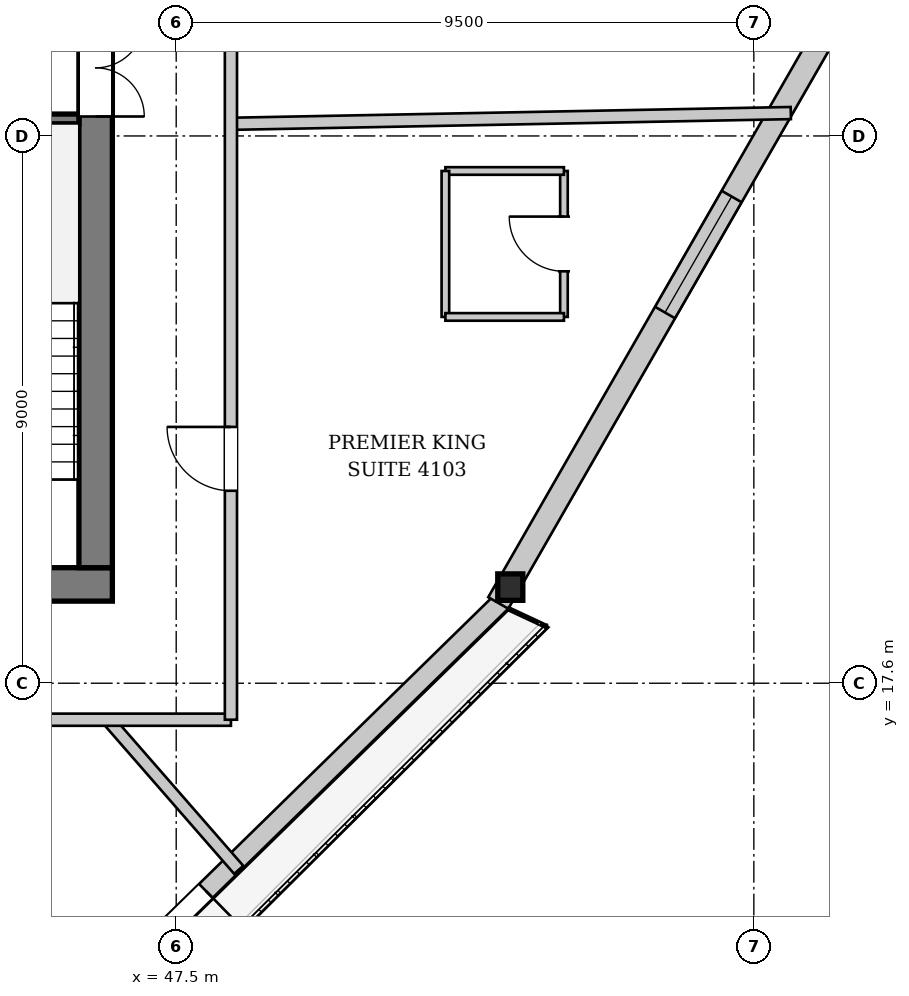
"""IFC4 building model, lengths in metres.
Left out: names, types, materials, properties, quantities, classifications, styles, units other than length and angle.
Written with IfcOpenShell. Run it as: python <this file> out.ifc"""

import sys

from ifc_helpers import new_model, si_unit, direction, frame, frame_2d, origin, origin_2d, place, context, subcontext, project, spatial, rectangle, i_section, extrude, source, transform, mapped, element, fill, save


model = new_model("IFC4")
c1 = context("Model", 3, precision=1e-05, world=origin(), true_north=direction((0.0, 1.0)))
c2 = subcontext(c1, "Body", "Model", "MODEL_VIEW")
j1 = project(units=[si_unit("LENGTHUNIT", "METRE"), si_unit("PLANEANGLEUNIT", "RADIAN")], contexts=[c1])
p1 = place(None, origin())
s1 = spatial("IfcSite", under=j1, at=p1, CompositionType="ELEMENT")
p2 = place(p1, origin())
s2 = spatial("IfcBuilding", under=s1, at=p2, CompositionType="ELEMENT")
p3 = place(p2, frame((0.0, 0.0, 157.25)))
s3 = spatial("IfcBuildingStorey", under=s2, at=p3, CompositionType="ELEMENT", Elevation=157.25)
m1 = source(origin(), c2, "Body", "SweptSolid", [
    extrude(i_section(OverallWidth=0.412, OverallDepth=0.435, WebThickness=0.031, FlangeThickness=0.05, at=origin_2d()), origin(), (0.0, 0.0, 1.0), 3.459),
])
p4 = place(p3, frame((52.962, 18.826, 0.0), z_axis=(0.018843973792, 0.205166411286, 0.978545680248), x_axis=(-0.995808540484, 0.091462291128, 0.0)))
e1 = element("IfcColumn", 1, at=p4, inside=s3, PredefinedType="COLUMN", context=c2, shape_type="MappedRepresentation", body=[
    mapped(m1, transform((0.0, 0.0, 0.0), x_axis=(1.0, 0.0, 0.0), y_axis=(0.0, 1.0, 0.0), z_axis=(0.0, 0.0, 1.0), scale=1.0)),
])
p5 = place(p3, frame((52.85, 18.94, 0.0), z_axis=(0.0, 0.0, 1.0), x_axis=(-0.714884953244, -0.699242092287, 0.0)))
e2 = element("IfcWall", 2, at=p5, inside=s3, PredefinedType="SOLIDWALL", context=c2, shape_type="SweptSolid", body=[
    extrude(rectangle(XDim=23.598, YDim=0.32, at=frame_2d((11.799, 0.0))), origin(), (0.0, 0.0, 1.0), 2.722),
])
p6 = place(p5, frame((6.801, 0.0, 0.0)))
e3 = element("IfcOpeningElement", 3, at=p6, cuts=e2, PredefinedType="OPENING", context=c2, shape_type="SweptSolid", body=[
    extrude(rectangle(XDim=1.5, YDim=2.3, at=frame_2d((0.75, 1.15))), frame((0.0, 0.17, 0.0), z_axis=(0.0, -1.0, 0.0), x_axis=(1.0, 0.0, 0.0)), (0.0, 0.0, 1.0), 0.34),
])
p7 = place(p5, frame((16.163, 0.0, 0.252)))
e4 = element("IfcOpeningElement", 4, at=p7, cuts=e2, PredefinedType="OPENING", context=c2, shape_type="SweptSolid", body=[
    extrude(rectangle(XDim=2.6, YDim=2.35, at=frame_2d((1.3, 1.175))), frame((0.0, 0.17, 0.0), z_axis=(0.0, -1.0, 0.0), x_axis=(1.0, 0.0, 0.0)), (0.0, 0.0, 1.0), 0.34),
])
p8 = place(p3, frame((64.549, 39.384, 0.0), z_axis=(0.0, 0.0, 1.0), x_axis=(-0.49798956696, -0.867183020589, 0.0)))
e5 = element("IfcWall", 5, at=p8, inside=s3, PredefinedType="SOLIDWALL", context=c2, shape_type="SweptSolid", body=[
    extrude(rectangle(XDim=23.598, YDim=0.38, at=frame_2d((11.799, 0.0))), origin(), (0.0, 0.0, 1.0), 2.722),
])
p9 = place(p8, frame((5.507, 0.0, 0.352)))
e6 = element("IfcOpeningElement", 6, at=p9, cuts=e5, PredefinedType="OPENING", context=c2, shape_type="SweptSolid", body=[
    extrude(rectangle(XDim=2.2, YDim=2.25, at=frame_2d((1.1, 1.125))), frame((0.0, 0.2, 0.0), z_axis=(0.0, -1.0, 0.0), x_axis=(1.0, 0.0, 0.0)), (0.0, 0.0, 1.0), 0.4),
])
p10 = place(p8, frame((15.891, 0.0, 0.352)))
e7 = element("IfcOpeningElement", 7, at=p10, cuts=e5, PredefinedType="OPENING", context=c2, shape_type="SweptSolid", body=[
    extrude(rectangle(XDim=2.2, YDim=2.25, at=frame_2d((1.1, 1.125))), frame((0.0, 0.2, 0.0), z_axis=(0.0, -1.0, 0.0), x_axis=(1.0, 0.0, 0.0)), (0.0, 0.0, 1.0), 0.4),
])
p11 = place(p3, frame((46.45, 19.225, 0.0), z_axis=(0.0, 0.0, 1.0), x_axis=(-1.0, 0.0, 0.0)))
e8 = element("IfcWall", 8, at=p11, inside=s3, PredefinedType="SHEAR", context=c2, shape_type="SweptSolid", body=[
    extrude(rectangle(XDim=16.9, YDim=0.55, at=frame_2d((8.45, 0.0))), origin(), (0.0, 0.0, 1.0), 3.33),
])
p12 = place(p11, frame((4.65, 0.0, 0.0)))
e9 = element("IfcOpeningElement", 9, at=p12, cuts=e8, PredefinedType="OPENING", context=c2, shape_type="SweptSolid", body=[
    extrude(rectangle(XDim=1.12, YDim=2.25, at=frame_2d((0.56, 1.125))), frame((0.0, 0.285, 0.0), z_axis=(0.0, -1.0, 0.0), x_axis=(1.0, 0.0, 0.0)), (0.0, 0.0, 1.0), 0.57),
])
p13 = place(p11, frame((11.15, 0.0, 0.0)))
e10 = element("IfcOpeningElement", 10, at=p13, cuts=e8, PredefinedType="OPENING", context=c2, shape_type="SweptSolid", body=[
    extrude(rectangle(XDim=1.12, YDim=2.25, at=frame_2d((0.56, 1.125))), frame((0.0, 0.285, 0.0), z_axis=(0.0, -1.0, 0.0), x_axis=(1.0, 0.0, 0.0)), (0.0, 0.0, 1.0), 0.57),
])
p14 = place(p3, frame((46.175, 33.7, 0.0), z_axis=(0.0, 0.0, 1.0), x_axis=(0.0, -1.0, 0.0)))
e11 = element("IfcWall", 11, at=p14, inside=s3, PredefinedType="SHEAR", context=c2, shape_type="SweptSolid", body=[
    extrude(rectangle(XDim=14.2, YDim=0.55, at=frame_2d((7.1, 0.0))), origin(), (0.0, 0.0, 1.0), 3.33),
])
p15 = place(p14, frame((5.18, 0.0, 0.0)))
e12 = element("IfcOpeningElement", 12, at=p15, cuts=e11, PredefinedType="OPENING", context=c2, shape_type="SweptSolid", body=[
    extrude(rectangle(XDim=1.6, YDim=2.2, at=frame_2d((0.8, 1.1))), frame((0.0, 0.285, 0.0), z_axis=(0.0, -1.0, 0.0), x_axis=(1.0, 0.0, 0.0)), (0.0, 0.0, 1.0), 0.57),
])
p16 = place(p14, frame((2.05, 0.0, 0.0)))
e13 = element("IfcOpeningElement", 13, at=p16, cuts=e11, PredefinedType="OPENING", context=c2, shape_type="SweptSolid", body=[
    extrude(rectangle(XDim=0.95, YDim=2.1, at=frame_2d((0.475, 1.05))), frame((0.0, 0.285, 0.0), z_axis=(0.0, -1.0, 0.0), x_axis=(1.0, 0.0, 0.0)), (0.0, 0.0, 1.0), 0.57),
])
p17 = place(p3, frame((42.88, 26.88, 0.0), z_axis=(0.0, 0.0, 1.0), x_axis=(1.0, 0.0, 0.0)))
e14 = element("IfcWall", 14, at=p17, inside=s3, PredefinedType="PARTITIONING", context=c2, shape_type="SweptSolid", body=[
    extrude(rectangle(XDim=3.02, YDim=0.16, at=frame_2d((1.51, 0.0))), origin(), (0.0, 0.0, 1.0), 3.33),
])
p18 = place(p3, frame((46.375, 17.0, 0.0), z_axis=(0.0, 0.0, 1.0), x_axis=(0.657406566199, -0.753536068625, 0.0)))
e15 = element("IfcWall", 15, at=p18, inside=s3, PredefinedType="PARTITIONING", context=c2, shape_type="SweptSolid", body=[
    extrude(rectangle(XDim=3.276, YDim=0.2, at=frame_2d((1.638, 0.0))), origin(), (0.0, 0.0, 1.0), 3.33),
])
p19 = place(p3, frame((48.4, 26.8, 0.0), z_axis=(0.0, 0.0, 1.0), x_axis=(0.999815805831, 0.019192561338, 0.0)))
e16 = element("IfcWall", 16, at=p19, inside=s3, PredefinedType="PARTITIONING", context=c2, shape_type="SweptSolid", body=[
    extrude(rectangle(XDim=9.21, YDim=0.2, at=frame_2d((4.605, 0.0))), origin(), (0.0, 0.0, 1.0), 3.33),
])
p20 = place(p3, frame((53.877, 23.624, 0.0), z_axis=(0.0, 0.0, 1.0), x_axis=(0.0, 1.0, 0.0)))
e17 = element("IfcWall", 17, at=p20, inside=s3, PredefinedType="PARTITIONING", context=c2, shape_type="SweptSolid", body=[
    extrude(rectangle(XDim=2.4, YDim=0.125, at=frame_2d((1.2, 0.0))), origin(), (0.0, 0.0, 1.0), 3.33),
])
p21 = place(p20, frame((0.75, 0.0, 0.0)))
e18 = element("IfcOpeningElement", 18, at=p21, cuts=e17, PredefinedType="OPENING", context=c2, shape_type="SweptSolid", body=[
    extrude(rectangle(XDim=0.9, YDim=2.1, at=frame_2d((0.45, 1.05))), frame((0.0, 0.073, 0.0), z_axis=(0.0, -1.0, 0.0), x_axis=(1.0, 0.0, 0.0)), (0.0, 0.0, 1.0), 0.145),
])
p22 = place(p3, frame((53.877, 26.024, 0.0), z_axis=(0.0, 0.0, 1.0), x_axis=(-1.0, 0.0, 0.0)))
e19 = element("IfcWall", 19, at=p22, inside=s3, PredefinedType="PARTITIONING", context=c2, shape_type="SweptSolid", body=[
    extrude(rectangle(XDim=1.95, YDim=0.125, at=frame_2d((0.975, 0.0))), origin(), (0.0, 0.0, 1.0), 3.33),
])
p23 = place(p3, frame((51.927, 26.024, 0.0), z_axis=(0.0, 0.0, 1.0), x_axis=(0.0, -1.0, 0.0)))
e20 = element("IfcWall", 20, at=p23, inside=s3, PredefinedType="PARTITIONING", context=c2, shape_type="SweptSolid", body=[
    extrude(rectangle(XDim=2.4, YDim=0.125, at=frame_2d((1.2, 0.0))), origin(), (0.0, 0.0, 1.0), 3.33),
])
p24 = place(p3, frame((51.927, 23.624, 0.0), z_axis=(0.0, 0.0, 1.0), x_axis=(1.0, 0.0, 0.0)))
e21 = element("IfcWall", 21, at=p24, inside=s3, PredefinedType="PARTITIONING", context=c2, shape_type="SweptSolid", body=[
    extrude(rectangle(XDim=1.95, YDim=0.125, at=frame_2d((0.975, 0.0))), origin(), (0.0, 0.0, 1.0), 3.33),
])
p25 = place(p3, frame((27.6, 17.0, 0.0), z_axis=(0.0, 0.0, 1.0), x_axis=(1.0, 0.0, 0.0)))
e22 = element("IfcWall", 22, at=p25, inside=s3, PredefinedType="PARTITIONING", context=c2, shape_type="SweptSolid", body=[
    extrude(rectangle(XDim=20.8, YDim=0.2, at=frame_2d((10.4, 0.0))), origin(), (0.0, 0.0, 1.0), 3.33),
])
p26 = place(p25, frame((0.3, 0.0, 0.0)))
e23 = element("IfcOpeningElement", 23, at=p26, cuts=e22, PredefinedType="OPENING", context=c2, shape_type="SweptSolid", body=[
    extrude(rectangle(XDim=1.05, YDim=2.2, at=frame_2d((0.525, 1.1))), frame((0.0, 0.11, 0.0), z_axis=(0.0, -1.0, 0.0), x_axis=(1.0, 0.0, 0.0)), (0.0, 0.0, 1.0), 0.22),
])
p27 = place(p25, frame((11.962, 0.0, 0.0)))
e24 = element("IfcOpeningElement", 24, at=p27, cuts=e22, PredefinedType="OPENING", context=c2, shape_type="SweptSolid", body=[
    extrude(rectangle(XDim=1.05, YDim=2.2, at=frame_2d((0.525, 1.1))), frame((0.0, 0.11, 0.0), z_axis=(0.0, -1.0, 0.0), x_axis=(1.0, 0.0, 0.0)), (0.0, 0.0, 1.0), 0.22),
])
p28 = place(p3, frame((48.4, 17.0, 0.0), z_axis=(0.0, 0.0, 1.0), x_axis=(0.0, 1.0, 0.0)))
e25 = element("IfcWall", 25, at=p28, inside=s3, PredefinedType="PARTITIONING", context=c2, shape_type="SweptSolid", body=[
    extrude(rectangle(XDim=19.2, YDim=0.2, at=frame_2d((9.6, 0.0))), origin(), (0.0, 0.0, 1.0), 3.33),
])
p29 = place(p28, frame((3.765, 0.0, 0.0)))
e26 = element("IfcOpeningElement", 26, at=p29, cuts=e25, PredefinedType="OPENING", context=c2, shape_type="SweptSolid", body=[
    extrude(rectangle(XDim=1.05, YDim=2.2, at=frame_2d((0.525, 1.1))), frame((0.0, 0.11, 0.0), z_axis=(0.0, -1.0, 0.0), x_axis=(1.0, 0.0, 0.0)), (0.0, 0.0, 1.0), 0.22),
])
p30 = place(p28, frame((14.06, 0.0, 0.0)))
e27 = element("IfcOpeningElement", 27, at=p30, cuts=e25, PredefinedType="OPENING", context=c2, shape_type="SweptSolid", body=[
    extrude(rectangle(XDim=1.05, YDim=2.2, at=frame_2d((0.525, 1.1))), frame((0.0, 0.11, 0.0), z_axis=(0.0, -1.0, 0.0), x_axis=(1.0, 0.0, 0.0)), (0.0, 0.0, 1.0), 0.22),
])
m2 = source(origin(), c2, "Body", "SweptSolid", [
    extrude(rectangle(XDim=1.5, YDim=2.3, at=frame_2d((0.75, 1.15))), frame((0.0, 0.025, 0.0), z_axis=(0.0, -1.0, 0.0), x_axis=(1.0, 0.0, 0.0)), (0.0, 0.0, 1.0), 0.05),
])
p31 = place(p6, origin())
e28 = element("IfcDoor", 28, at=p31, inside=s3, OperationType="DOUBLE_DOOR_SINGLE_SWING", PredefinedType="DOOR", context=c2, shape_type="MappedRepresentation", body=[
    mapped(m2, transform((0.0, 0.0, 0.0), x_axis=(1.0, 0.0, 0.0), y_axis=(0.0, 1.0, 0.0), z_axis=(0.0, 0.0, 1.0), scale=1.0)),
])
fill(e3, e28)
m3 = source(origin(), c2, "Body", "SweptSolid", [
    extrude(rectangle(XDim=2.2, YDim=2.25, at=frame_2d((1.1, 1.125))), frame((0.0, 0.03, 0.0), z_axis=(0.0, -1.0, 0.0), x_axis=(1.0, 0.0, 0.0)), (0.0, 0.0, 1.0), 0.06),
])
p32 = place(p10, origin())
e29 = element("IfcWindow", 29, at=p32, inside=s3, PartitioningType="SINGLE_PANEL", PredefinedType="WINDOW", context=c2, shape_type="MappedRepresentation", body=[
    mapped(m3, transform((0.0, 0.0, 0.0), x_axis=(1.0, 0.0, 0.0), y_axis=(0.0, 1.0, 0.0), z_axis=(0.0, 0.0, 1.0), scale=1.0)),
])
fill(e7, e29)
m4 = source(origin(), c2, "Body", "SweptSolid", [
    extrude(rectangle(XDim=1.6, YDim=2.2, at=frame_2d((0.8, 1.1))), frame((0.0, 0.025, 0.0), z_axis=(0.0, -1.0, 0.0), x_axis=(1.0, 0.0, 0.0)), (0.0, 0.0, 1.0), 0.05),
])
p33 = place(p15, origin())
e30 = element("IfcDoor", 30, at=p33, inside=s3, OperationType="DOUBLE_DOOR_SINGLE_SWING", PredefinedType="DOOR", context=c2, shape_type="MappedRepresentation", body=[
    mapped(m4, transform((0.0, 0.0, 0.0), x_axis=(1.0, 0.0, 0.0), y_axis=(0.0, 1.0, 0.0), z_axis=(0.0, 0.0, 1.0), scale=1.0)),
])
fill(e12, e30)
m5 = source(origin(), c2, "Body", "SweptSolid", [
    extrude(rectangle(XDim=0.9, YDim=2.1, at=frame_2d((0.45, 1.05))), frame((0.0, 0.025, 0.0), z_axis=(0.0, -1.0, 0.0), x_axis=(1.0, 0.0, 0.0)), (0.0, 0.0, 1.0), 0.05),
])
p34 = place(p21, origin())
e31 = element("IfcDoor", 31, at=p34, inside=s3, OperationType="SINGLE_SWING_RIGHT", PredefinedType="DOOR", context=c2, shape_type="MappedRepresentation", body=[
    mapped(m5, transform((0.0, 0.0, 0.0), x_axis=(1.0, 0.0, 0.0), y_axis=(0.0, 1.0, 0.0), z_axis=(0.0, 0.0, 1.0), scale=1.0)),
])
fill(e18, e31)
m6 = source(origin(), c2, "Body", "SweptSolid", [
    extrude(rectangle(XDim=1.05, YDim=2.2, at=frame_2d((0.525, 1.1))), frame((0.0, 0.025, 0.0), z_axis=(0.0, -1.0, 0.0), x_axis=(1.0, 0.0, 0.0)), (0.0, 0.0, 1.0), 0.05),
])
p35 = place(p29, origin())
e32 = element("IfcDoor", 32, at=p35, inside=s3, OperationType="SINGLE_SWING_RIGHT", PredefinedType="DOOR", context=c2, shape_type="MappedRepresentation", body=[
    mapped(m6, transform((0.0, 0.0, 0.0), x_axis=(1.0, 0.0, 0.0), y_axis=(0.0, 1.0, 0.0), z_axis=(0.0, 0.0, 1.0), scale=1.0)),
])
fill(e26, e32)
save(model, sys.argv[1])
